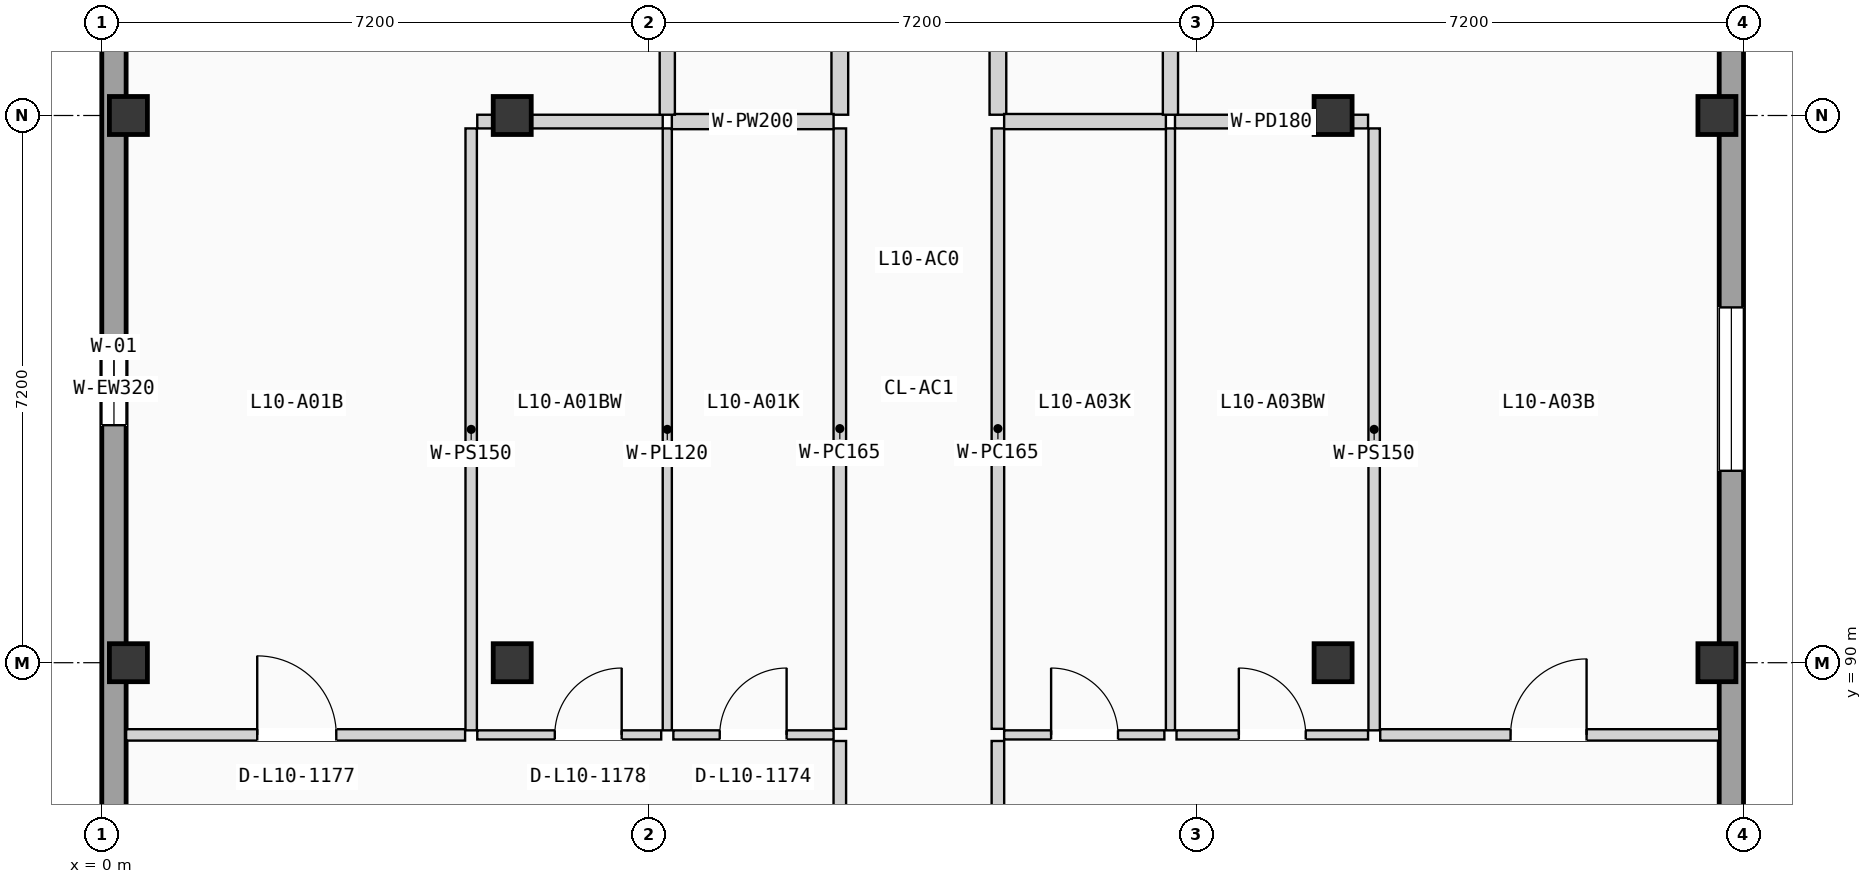
"""IFC4 building model, lengths in metres.
Left out: names, types, materials, properties, quantities, classifications, styles, units other than length and angle.
Written with IfcOpenShell. Run it as: python <this file> out.ifc"""

import sys

from ifc_helpers import new_model, si_unit, direction, frame, frame_2d, origin, origin_2d, place, context, subcontext, project, spatial, rectangle, extrude, element, fill, save


model = new_model("IFC4")
c1 = context("Model", 3, precision=1e-05, world=origin(), true_north=direction((0.0, 1.0)))
c2 = subcontext(c1, "Body", "Model", "MODEL_VIEW")
j1 = project(units=[si_unit("LENGTHUNIT", "METRE"), si_unit("PLANEANGLEUNIT", "RADIAN")], contexts=[c1])
p1 = place(None, origin())
s1 = spatial("IfcSite", under=j1, at=p1, CompositionType="ELEMENT")
p2 = place(p1, origin())
s2 = spatial("IfcBuilding", under=s1, at=p2, CompositionType="ELEMENT")
p3 = place(p2, frame((0.0, 0.0, 34.125)))
s3 = spatial("IfcBuildingStorey", under=s2, at=p3, CompositionType="ELEMENT", Elevation=34.125)
for number, where, z_axis, x_axis in (
    (1, (0.35, 90.0, 0.0), (0.0, 0.0, 1.0), (1.0, 0.0, 0.0)),
    (2, (0.35, 97.2, 0.0), (0.0, 0.0, 1.0), (1.0, 0.0, 0.0)),
    (3, (5.4, 90.0, 0.0), (0.0, 0.0, 1.0), (1.0, 0.0, 0.0)),
    (4, (5.4, 97.2, 0.0), (0.0, 0.0, 1.0), (1.0, 0.0, 0.0)),
    (5, (16.2, 90.0, 0.0), (0.0, 0.0, 1.0), (1.0, 0.0, 0.0)),
    (6, (16.2, 97.2, 0.0), (0.0, 0.0, 1.0), (1.0, 0.0, 0.0)),
    (7, (21.25, 90.0, 0.0), (0.0, 0.0, 1.0), (1.0, 0.0, 0.0)),
    (8, (21.25, 97.2, 0.0), (0.0, 0.0, 1.0), (1.0, 0.0, 0.0)),
):
    element("IfcColumn", number, at=place(p3, frame(where, z_axis=z_axis, x_axis=x_axis)), inside=s3, PredefinedType="COLUMN", context=c2, shape_type="SweptSolid", body=[
        extrude(rectangle(XDim=0.5, YDim=0.5, at=origin_2d()), origin(), (0.0, 0.0, 1.0), 3.15),
    ])
p4 = place(p3, frame((0.16, 68.72, 0.0), z_axis=(0.0, 0.0, 1.0), x_axis=(0.0, 1.0, 0.0)))
e9 = element("IfcWall", 9, at=p4, inside=s3, PredefinedType="SOLIDWALL", context=c2, shape_type="SweptSolid", body=[
    extrude(rectangle(XDim=49.76, YDim=0.32, at=frame_2d((24.88, 0.0))), origin(), (0.0, 0.0, 1.0), 2.89),
])
p5 = place(p4, frame((16.755, 0.0, 0.705)))
e10 = element("IfcOpeningElement", 10, at=p5, cuts=e9, PredefinedType="OPENING", context=c2, shape_type="SweptSolid", body=[
    extrude(rectangle(XDim=1.85, YDim=1.5, at=frame_2d((0.925, 0.75))), frame((0.0, 0.17, 0.0), z_axis=(0.0, -1.0, 0.0), x_axis=(1.0, 0.0, 0.0)), (0.0, 0.0, 1.0), 0.34),
])
p6 = place(p4, frame((9.62, 0.0, 0.555)))
e11 = element("IfcOpeningElement", 11, at=p6, cuts=e9, PredefinedType="OPENING", context=c2, shape_type="SweptSolid", body=[
    extrude(rectangle(XDim=1.85, YDim=1.65, at=frame_2d((0.925, 0.825))), frame((0.0, 0.17, 0.0), z_axis=(0.0, -1.0, 0.0), x_axis=(1.0, 0.0, 0.0)), (0.0, 0.0, 1.0), 0.34),
])
p7 = place(p4, frame((24.405, 0.0, 0.85)))
e12 = element("IfcOpeningElement", 12, at=p7, cuts=e9, PredefinedType="OPENING", context=c2, shape_type="SweptSolid", body=[
    extrude(rectangle(XDim=0.95, YDim=1.2, at=frame_2d((0.475, 0.6))), frame((0.0, 0.17, 0.0), z_axis=(0.0, -1.0, 0.0), x_axis=(1.0, 0.0, 0.0)), (0.0, 0.0, 1.0), 0.34),
])
p8 = place(p4, frame((33.159, 0.0, 0.9)))
e13 = element("IfcOpeningElement", 13, at=p8, cuts=e9, PredefinedType="OPENING", context=c2, shape_type="SweptSolid", body=[
    extrude(rectangle(XDim=2.0, YDim=1.2, at=frame_2d((1.0, 0.6))), frame((0.0, 0.17, 0.0), z_axis=(0.0, -1.0, 0.0), x_axis=(1.0, 0.0, 0.0)), (0.0, 0.0, 1.0), 0.34),
])
p9 = place(p4, frame((29.749, 0.0, 0.855)))
e14 = element("IfcOpeningElement", 14, at=p9, cuts=e9, PredefinedType="OPENING", context=c2, shape_type="SweptSolid", body=[
    extrude(rectangle(XDim=2.0, YDim=1.35, at=frame_2d((1.0, 0.675))), frame((0.0, 0.17, 0.0), z_axis=(0.0, -1.0, 0.0), x_axis=(1.0, 0.0, 0.0)), (0.0, 0.0, 1.0), 0.34),
])
p10 = place(p4, frame((39.352, 0.0, 0.705)))
e15 = element("IfcOpeningElement", 15, at=p10, cuts=e9, PredefinedType="OPENING", context=c2, shape_type="SweptSolid", body=[
    extrude(rectangle(XDim=2.0, YDim=1.5, at=frame_2d((1.0, 0.75))), frame((0.0, 0.17, 0.0), z_axis=(0.0, -1.0, 0.0), x_axis=(1.0, 0.0, 0.0)), (0.0, 0.0, 1.0), 0.34),
])
p11 = place(p3, frame((21.44, 68.72, 0.0), z_axis=(0.0, 0.0, 1.0), x_axis=(0.0, 1.0, 0.0)))
e16 = element("IfcWall", 16, at=p11, inside=s3, PredefinedType="SOLIDWALL", context=c2, shape_type="SweptSolid", body=[
    extrude(rectangle(XDim=49.76, YDim=0.32, at=frame_2d((24.88, 0.0))), origin(), (0.0, 0.0, 1.0), 2.89),
])
p12 = place(p11, frame((16.68, 0.0, 0.555)))
e17 = element("IfcOpeningElement", 17, at=p12, cuts=e16, PredefinedType="OPENING", context=c2, shape_type="SweptSolid", body=[
    extrude(rectangle(XDim=2.0, YDim=1.65, at=frame_2d((1.0, 0.825))), frame((0.0, 0.17, 0.0), z_axis=(0.0, -1.0, 0.0), x_axis=(1.0, 0.0, 0.0)), (0.0, 0.0, 1.0), 0.34),
])
p13 = place(p11, frame((10.07, 0.0, 0.85)))
e18 = element("IfcOpeningElement", 18, at=p13, cuts=e16, PredefinedType="OPENING", context=c2, shape_type="SweptSolid", body=[
    extrude(rectangle(XDim=0.95, YDim=1.2, at=frame_2d((0.475, 0.6))), frame((0.0, 0.17, 0.0), z_axis=(0.0, -1.0, 0.0), x_axis=(1.0, 0.0, 0.0)), (0.0, 0.0, 1.0), 0.34),
])
p14 = place(p11, frame((23.805, 0.0, 0.9)))
e19 = element("IfcOpeningElement", 19, at=p14, cuts=e16, PredefinedType="OPENING", context=c2, shape_type="SweptSolid", body=[
    extrude(rectangle(XDim=2.15, YDim=1.2, at=frame_2d((1.075, 0.6))), frame((0.0, 0.17, 0.0), z_axis=(0.0, -1.0, 0.0), x_axis=(1.0, 0.0, 0.0)), (0.0, 0.0, 1.0), 0.34),
])
p15 = place(p11, frame((33.684, 0.0, 0.85)))
e20 = element("IfcOpeningElement", 20, at=p15, cuts=e16, PredefinedType="OPENING", context=c2, shape_type="SweptSolid", body=[
    extrude(rectangle(XDim=0.95, YDim=1.2, at=frame_2d((0.475, 0.6))), frame((0.0, 0.17, 0.0), z_axis=(0.0, -1.0, 0.0), x_axis=(1.0, 0.0, 0.0)), (0.0, 0.0, 1.0), 0.34),
])
p16 = place(p11, frame((29.674, 0.0, 0.705)))
e21 = element("IfcOpeningElement", 21, at=p16, cuts=e16, PredefinedType="OPENING", context=c2, shape_type="SweptSolid", body=[
    extrude(rectangle(XDim=2.15, YDim=1.5, at=frame_2d((1.075, 0.75))), frame((0.0, 0.17, 0.0), z_axis=(0.0, -1.0, 0.0), x_axis=(1.0, 0.0, 0.0)), (0.0, 0.0, 1.0), 0.34),
])
p17 = place(p11, frame((39.276, 0.0, 0.555)))
e22 = element("IfcOpeningElement", 22, at=p17, cuts=e16, PredefinedType="OPENING", context=c2, shape_type="SweptSolid", body=[
    extrude(rectangle(XDim=2.15, YDim=1.65, at=frame_2d((1.075, 0.825))), frame((0.0, 0.17, 0.0), z_axis=(0.0, -1.0, 0.0), x_axis=(1.0, 0.0, 0.0)), (0.0, 0.0, 1.0), 0.34),
])
p18 = place(p3, frame((9.71, 83.83, 0.0), z_axis=(0.0, 0.0, 1.0), x_axis=(0.0, 1.0, 0.0)))
e23 = element("IfcWall", 23, at=p18, inside=s3, PredefinedType="PARTITIONING", context=c2, shape_type="SweptSolid", body=[
    extrude(rectangle(XDim=5.14, YDim=0.165, at=frame_2d((2.57, 0.0))), origin(), (0.0, 0.0, 1.0), 2.87),
])
p19 = place(p18, frame((2.08, 0.0, 0.0)))
e24 = element("IfcOpeningElement", 24, at=p19, cuts=e23, PredefinedType="OPENING", context=c2, shape_type="SweptSolid", body=[
    extrude(rectangle(XDim=0.98, YDim=2.08, at=frame_2d((0.49, 1.04))), frame((0.0, 0.093, 0.0), z_axis=(0.0, -1.0, 0.0), x_axis=(1.0, 0.0, 0.0)), (0.0, 0.0, 1.0), 0.185),
])
p20 = place(p3, frame((9.71, 89.13, 0.0), z_axis=(0.0, 0.0, 1.0), x_axis=(0.0, 1.0, 0.0)))
e25 = element("IfcWall", 25, at=p20, inside=s3, PredefinedType="PARTITIONING", context=c2, shape_type="SweptSolid", body=[
    extrude(rectangle(XDim=7.9, YDim=0.165, at=frame_2d((3.95, 0.0))), origin(), (0.0, 0.0, 1.0), 2.87),
])
p21 = place(p3, frame((9.71, 97.21, 0.0), z_axis=(0.0, 0.0, 1.0), x_axis=(0.0, 1.0, 0.0)))
e26 = element("IfcWall", 26, at=p21, inside=s3, PredefinedType="PLUMBINGWALL", context=c2, shape_type="SweptSolid", body=[
    extrude(rectangle(XDim=4.257, YDim=0.22, at=frame_2d((2.128, 0.0))), origin(), (0.0, 0.0, 1.0), 2.87),
])
p22 = place(p3, frame((11.79, 83.83, 0.0), z_axis=(0.0, 0.0, 1.0), x_axis=(0.0, 1.0, 0.0)))
e27 = element("IfcWall", 27, at=p22, inside=s3, PredefinedType="PARTITIONING", context=c2, shape_type="SweptSolid", body=[
    extrude(rectangle(XDim=5.14, YDim=0.165, at=frame_2d((2.57, 0.0))), origin(), (0.0, 0.0, 1.0), 2.87),
])
p23 = place(p22, frame((2.08, 0.0, 0.0)))
e28 = element("IfcOpeningElement", 28, at=p23, cuts=e27, PredefinedType="OPENING", context=c2, shape_type="SweptSolid", body=[
    extrude(rectangle(XDim=0.98, YDim=2.08, at=frame_2d((0.49, 1.04))), frame((0.0, 0.093, 0.0), z_axis=(0.0, -1.0, 0.0), x_axis=(1.0, 0.0, 0.0)), (0.0, 0.0, 1.0), 0.185),
])
p24 = place(p3, frame((11.79, 89.13, 0.0), z_axis=(0.0, 0.0, 1.0), x_axis=(0.0, 1.0, 0.0)))
e29 = element("IfcWall", 29, at=p24, inside=s3, PredefinedType="PARTITIONING", context=c2, shape_type="SweptSolid", body=[
    extrude(rectangle(XDim=7.9, YDim=0.165, at=frame_2d((3.95, 0.0))), origin(), (0.0, 0.0, 1.0), 2.87),
])
p25 = place(p3, frame((11.79, 97.21, 0.0), z_axis=(0.0, 0.0, 1.0), x_axis=(0.0, 1.0, 0.0)))
e30 = element("IfcWall", 30, at=p25, inside=s3, PredefinedType="PLUMBINGWALL", context=c2, shape_type="SweptSolid", body=[
    extrude(rectangle(XDim=4.257, YDim=0.22, at=frame_2d((2.128, 0.0))), origin(), (0.0, 0.0, 1.0), 2.87),
])
p26 = place(p3, frame((7.52, 89.05, 0.0), z_axis=(0.0, 0.0, 1.0), x_axis=(1.0, 0.0, 0.0)))
e31 = element("IfcWall", 31, at=p26, inside=s3, PredefinedType="PARTITIONING", context=c2, shape_type="SweptSolid", body=[
    extrude(rectangle(XDim=2.108, YDim=0.12, at=frame_2d((1.054, 0.0))), origin(), (0.0, 0.0, 1.0), 2.87),
])
p27 = place(p26, frame((0.61, 0.0, 0.0)))
e32 = element("IfcOpeningElement", 32, at=p27, cuts=e31, PredefinedType="OPENING", context=c2, shape_type="SweptSolid", body=[
    extrude(rectangle(XDim=0.88, YDim=2.02, at=frame_2d((0.44, 1.01))), frame((0.0, 0.07, 0.0), z_axis=(0.0, -1.0, 0.0), x_axis=(1.0, 0.0, 0.0)), (0.0, 0.0, 1.0), 0.14),
])
p28 = place(p3, frame((0.32, 89.05, 0.0), z_axis=(0.0, 0.0, 1.0), x_axis=(1.0, 0.0, 0.0)))
e33 = element("IfcWall", 33, at=p28, inside=s3, PredefinedType="PARTITIONING", context=c2, shape_type="SweptSolid", body=[
    extrude(rectangle(XDim=4.46, YDim=0.15, at=frame_2d((2.23, 0.0))), origin(), (0.0, 0.0, 1.0), 2.87),
])
p29 = place(p28, frame((1.725, 0.0, 0.0)))
e34 = element("IfcOpeningElement", 34, at=p29, cuts=e33, PredefinedType="OPENING", context=c2, shape_type="SweptSolid", body=[
    extrude(rectangle(XDim=1.04, YDim=2.08, at=frame_2d((0.52, 1.04))), frame((0.0, 0.085, 0.0), z_axis=(0.0, -1.0, 0.0), x_axis=(1.0, 0.0, 0.0)), (0.0, 0.0, 1.0), 0.17),
])
p30 = place(p3, frame((4.94, 89.05, 0.0), z_axis=(0.0, 0.0, 1.0), x_axis=(1.0, 0.0, 0.0)))
e35 = element("IfcWall", 35, at=p30, inside=s3, PredefinedType="PARTITIONING", context=c2, shape_type="SweptSolid", body=[
    extrude(rectangle(XDim=2.42, YDim=0.12, at=frame_2d((1.21, 0.0))), origin(), (0.0, 0.0, 1.0), 2.87),
])
p31 = place(p30, frame((1.02, 0.0, 0.0)))
e36 = element("IfcOpeningElement", 36, at=p31, cuts=e35, PredefinedType="OPENING", context=c2, shape_type="SweptSolid", body=[
    extrude(rectangle(XDim=0.88, YDim=2.02, at=frame_2d((0.44, 1.01))), frame((0.0, 0.07, 0.0), z_axis=(0.0, -1.0, 0.0), x_axis=(1.0, 0.0, 0.0)), (0.0, 0.0, 1.0), 0.14),
])
p32 = place(p3, frame((7.44, 89.11, 0.0), z_axis=(0.0, 0.0, 1.0), x_axis=(0.0, 1.0, 0.0)))
e37 = element("IfcWall", 37, at=p32, inside=s3, PredefinedType="PARTITIONING", context=c2, shape_type="SweptSolid", body=[
    extrude(rectangle(XDim=7.92, YDim=0.12, at=frame_2d((3.96, 0.0))), origin(), (0.0, 0.0, 1.0), 2.87),
])
p33 = place(p3, frame((7.5, 97.12, 0.0), z_axis=(0.0, 0.0, 1.0), x_axis=(1.0, 0.0, 0.0)))
e38 = element("IfcWall", 38, at=p33, inside=s3, PredefinedType="PLUMBINGWALL", context=c2, shape_type="SweptSolid", body=[
    extrude(rectangle(XDim=2.128, YDim=0.2, at=frame_2d((1.064, 0.0))), origin(), (0.0, 0.0, 1.0), 2.16),
])
p34 = place(p3, frame((4.86, 89.11, 0.0), z_axis=(0.0, 0.0, 1.0), x_axis=(0.0, 1.0, 0.0)))
e39 = element("IfcWall", 39, at=p34, inside=s3, PredefinedType="PARTITIONING", context=c2, shape_type="SweptSolid", body=[
    extrude(rectangle(XDim=7.92, YDim=0.15, at=frame_2d((3.96, 0.0))), origin(), (0.0, 0.0, 1.0), 2.87),
])
p35 = place(p3, frame((4.94, 97.12, 0.0), z_axis=(0.0, 0.0, 1.0), x_axis=(1.0, 0.0, 0.0)))
e40 = element("IfcWall", 40, at=p35, inside=s3, PredefinedType="PARTITIONING", context=c2, shape_type="SweptSolid", body=[
    extrude(rectangle(XDim=2.44, YDim=0.18, at=frame_2d((1.22, 0.0))), origin(), (0.0, 0.0, 1.0), 2.16),
])
p36 = place(p3, frame((7.44, 97.21, 0.0), z_axis=(0.0, 0.0, 1.0), x_axis=(0.0, 1.0, 0.0)))
e41 = element("IfcWall", 41, at=p36, inside=s3, PredefinedType="PLUMBINGWALL", context=c2, shape_type="SweptSolid", body=[
    extrude(rectangle(XDim=4.257, YDim=0.2, at=frame_2d((2.128, 0.0))), origin(), (0.0, 0.0, 1.0), 2.87),
])
p37 = place(p3, frame((11.872, 89.05, 0.0), z_axis=(0.0, 0.0, 1.0), x_axis=(1.0, 0.0, 0.0)))
e42 = element("IfcWall", 42, at=p37, inside=s3, PredefinedType="PARTITIONING", context=c2, shape_type="SweptSolid", body=[
    extrude(rectangle(XDim=2.108, YDim=0.12, at=frame_2d((1.054, 0.0))), origin(), (0.0, 0.0, 1.0), 2.87),
])
p38 = place(p37, frame((0.618, 0.0, 0.0)))
e43 = element("IfcOpeningElement", 43, at=p38, cuts=e42, PredefinedType="OPENING", context=c2, shape_type="SweptSolid", body=[
    extrude(rectangle(XDim=0.88, YDim=2.02, at=frame_2d((0.44, 1.01))), frame((0.0, 0.07, 0.0), z_axis=(0.0, -1.0, 0.0), x_axis=(1.0, 0.0, 0.0)), (0.0, 0.0, 1.0), 0.14),
])
p39 = place(p3, frame((16.82, 89.05, 0.0), z_axis=(0.0, 0.0, 1.0), x_axis=(1.0, 0.0, 0.0)))
e44 = element("IfcWall", 44, at=p39, inside=s3, PredefinedType="PARTITIONING", context=c2, shape_type="SweptSolid", body=[
    extrude(rectangle(XDim=4.46, YDim=0.15, at=frame_2d((2.23, 0.0))), origin(), (0.0, 0.0, 1.0), 2.87),
])
p40 = place(p39, frame((1.715, 0.0, 0.0)))
e45 = element("IfcOpeningElement", 45, at=p40, cuts=e44, PredefinedType="OPENING", context=c2, shape_type="SweptSolid", body=[
    extrude(rectangle(XDim=1.0, YDim=2.06, at=frame_2d((0.5, 1.03))), frame((0.0, 0.085, 0.0), z_axis=(0.0, -1.0, 0.0), x_axis=(1.0, 0.0, 0.0)), (0.0, 0.0, 1.0), 0.17),
])
p41 = place(p3, frame((14.14, 89.05, 0.0), z_axis=(0.0, 0.0, 1.0), x_axis=(1.0, 0.0, 0.0)))
e46 = element("IfcWall", 46, at=p41, inside=s3, PredefinedType="PARTITIONING", context=c2, shape_type="SweptSolid", body=[
    extrude(rectangle(XDim=2.52, YDim=0.12, at=frame_2d((1.26, 0.0))), origin(), (0.0, 0.0, 1.0), 2.87),
])
p42 = place(p41, frame((0.82, 0.0, 0.0)))
e47 = element("IfcOpeningElement", 47, at=p42, cuts=e46, PredefinedType="OPENING", context=c2, shape_type="SweptSolid", body=[
    extrude(rectangle(XDim=0.88, YDim=2.02, at=frame_2d((0.44, 1.01))), frame((0.0, 0.07, 0.0), z_axis=(0.0, -1.0, 0.0), x_axis=(1.0, 0.0, 0.0)), (0.0, 0.0, 1.0), 0.14),
])
p43 = place(p3, frame((14.06, 89.11, 0.0), z_axis=(0.0, 0.0, 1.0), x_axis=(0.0, 1.0, 0.0)))
e48 = element("IfcWall", 48, at=p43, inside=s3, PredefinedType="PARTITIONING", context=c2, shape_type="SweptSolid", body=[
    extrude(rectangle(XDim=7.92, YDim=0.12, at=frame_2d((3.96, 0.0))), origin(), (0.0, 0.0, 1.0), 2.87),
])
p44 = place(p3, frame((11.872, 97.12, 0.0), z_axis=(0.0, 0.0, 1.0), x_axis=(1.0, 0.0, 0.0)))
e49 = element("IfcWall", 49, at=p44, inside=s3, PredefinedType="PLUMBINGWALL", context=c2, shape_type="SweptSolid", body=[
    extrude(rectangle(XDim=2.128, YDim=0.2, at=frame_2d((1.064, 0.0))), origin(), (0.0, 0.0, 1.0), 2.16),
])
p45 = place(p3, frame((16.74, 89.11, 0.0), z_axis=(0.0, 0.0, 1.0), x_axis=(0.0, 1.0, 0.0)))
e50 = element("IfcWall", 50, at=p45, inside=s3, PredefinedType="PARTITIONING", context=c2, shape_type="SweptSolid", body=[
    extrude(rectangle(XDim=7.92, YDim=0.15, at=frame_2d((3.96, 0.0))), origin(), (0.0, 0.0, 1.0), 2.87),
])
p46 = place(p3, frame((14.12, 97.12, 0.0), z_axis=(0.0, 0.0, 1.0), x_axis=(1.0, 0.0, 0.0)))
e51 = element("IfcWall", 51, at=p46, inside=s3, PredefinedType="PARTITIONING", context=c2, shape_type="SweptSolid", body=[
    extrude(rectangle(XDim=2.54, YDim=0.18, at=frame_2d((1.27, 0.0))), origin(), (0.0, 0.0, 1.0), 2.16),
])
p47 = place(p3, frame((14.06, 97.21, 0.0), z_axis=(0.0, 0.0, 1.0), x_axis=(0.0, 1.0, 0.0)))
e52 = element("IfcWall", 52, at=p47, inside=s3, PredefinedType="PLUMBINGWALL", context=c2, shape_type="SweptSolid", body=[
    extrude(rectangle(XDim=4.257, YDim=0.2, at=frame_2d((2.128, 0.0))), origin(), (0.0, 0.0, 1.0), 2.87),
])
p48 = place(p7, origin())
e53 = element("IfcWindow", 53, at=p48, inside=s3, PartitioningType="SINGLE_PANEL", PredefinedType="WINDOW", context=c2, shape_type="SweptSolid", body=[
    extrude(rectangle(XDim=0.95, YDim=1.2, at=frame_2d((0.475, 0.6))), frame((0.0, 0.03, 0.0), z_axis=(0.0, -1.0, 0.0), x_axis=(1.0, 0.0, 0.0)), (0.0, 0.0, 1.0), 0.06),
])
fill(e12, e53)
p49 = place(p14, origin())
e54 = element("IfcWindow", 54, at=p49, inside=s3, PartitioningType="DOUBLE_PANEL_VERTICAL", PredefinedType="WINDOW", context=c2, shape_type="SweptSolid", body=[
    extrude(rectangle(XDim=2.15, YDim=1.2, at=frame_2d((1.075, 0.6))), frame((0.0, 0.03, 0.0), z_axis=(0.0, -1.0, 0.0), x_axis=(1.0, 0.0, 0.0)), (0.0, 0.0, 1.0), 0.06),
])
fill(e19, e54)
p50 = place(p27, origin())
e55 = element("IfcDoor", 55, at=p50, inside=s3, OperationType="SINGLE_SWING_RIGHT", PredefinedType="DOOR", context=c2, shape_type="SweptSolid", body=[
    extrude(rectangle(XDim=0.88, YDim=2.02, at=frame_2d((0.44, 1.01))), frame((0.0, 0.025, 0.0), z_axis=(0.0, -1.0, 0.0), x_axis=(1.0, 0.0, 0.0)), (0.0, 0.0, 1.0), 0.05),
])
fill(e32, e55)
p51 = place(p29, origin())
e56 = element("IfcDoor", 56, at=p51, inside=s3, OperationType="SINGLE_SWING_LEFT", PredefinedType="DOOR", context=c2, shape_type="SweptSolid", body=[
    extrude(rectangle(XDim=1.04, YDim=2.08, at=frame_2d((0.52, 1.04))), frame((0.0, 0.025, 0.0), z_axis=(0.0, -1.0, 0.0), x_axis=(1.0, 0.0, 0.0)), (0.0, 0.0, 1.0), 0.05),
])
fill(e34, e56)
p52 = place(p31, origin())
e57 = element("IfcDoor", 57, at=p52, inside=s3, OperationType="SINGLE_SWING_RIGHT", PredefinedType="DOOR", context=c2, shape_type="SweptSolid", body=[
    extrude(rectangle(XDim=0.88, YDim=2.02, at=frame_2d((0.44, 1.01))), frame((0.0, 0.025, 0.0), z_axis=(0.0, -1.0, 0.0), x_axis=(1.0, 0.0, 0.0)), (0.0, 0.0, 1.0), 0.05),
])
fill(e36, e57)
p53 = place(p38, origin())
e58 = element("IfcDoor", 58, at=p53, inside=s3, OperationType="SINGLE_SWING_LEFT", PredefinedType="DOOR", context=c2, shape_type="SweptSolid", body=[
    extrude(rectangle(XDim=0.88, YDim=2.02, at=frame_2d((0.44, 1.01))), frame((0.0, 0.025, 0.0), z_axis=(0.0, -1.0, 0.0), x_axis=(1.0, 0.0, 0.0)), (0.0, 0.0, 1.0), 0.05),
])
fill(e43, e58)
p54 = place(p40, origin())
e59 = element("IfcDoor", 59, at=p54, inside=s3, OperationType="SINGLE_SWING_RIGHT", PredefinedType="DOOR", context=c2, shape_type="SweptSolid", body=[
    extrude(rectangle(XDim=1.0, YDim=2.06, at=frame_2d((0.5, 1.03))), frame((0.0, 0.025, 0.0), z_axis=(0.0, -1.0, 0.0), x_axis=(1.0, 0.0, 0.0)), (0.0, 0.0, 1.0), 0.05),
])
fill(e45, e59)
p55 = place(p42, origin())
e60 = element("IfcDoor", 60, at=p55, inside=s3, OperationType="SINGLE_SWING_LEFT", PredefinedType="DOOR", context=c2, shape_type="SweptSolid", body=[
    extrude(rectangle(XDim=0.88, YDim=2.02, at=frame_2d((0.44, 1.01))), frame((0.0, 0.025, 0.0), z_axis=(0.0, -1.0, 0.0), x_axis=(1.0, 0.0, 0.0)), (0.0, 0.0, 1.0), 0.05),
])
fill(e47, e60)
save(model, sys.argv[1])
